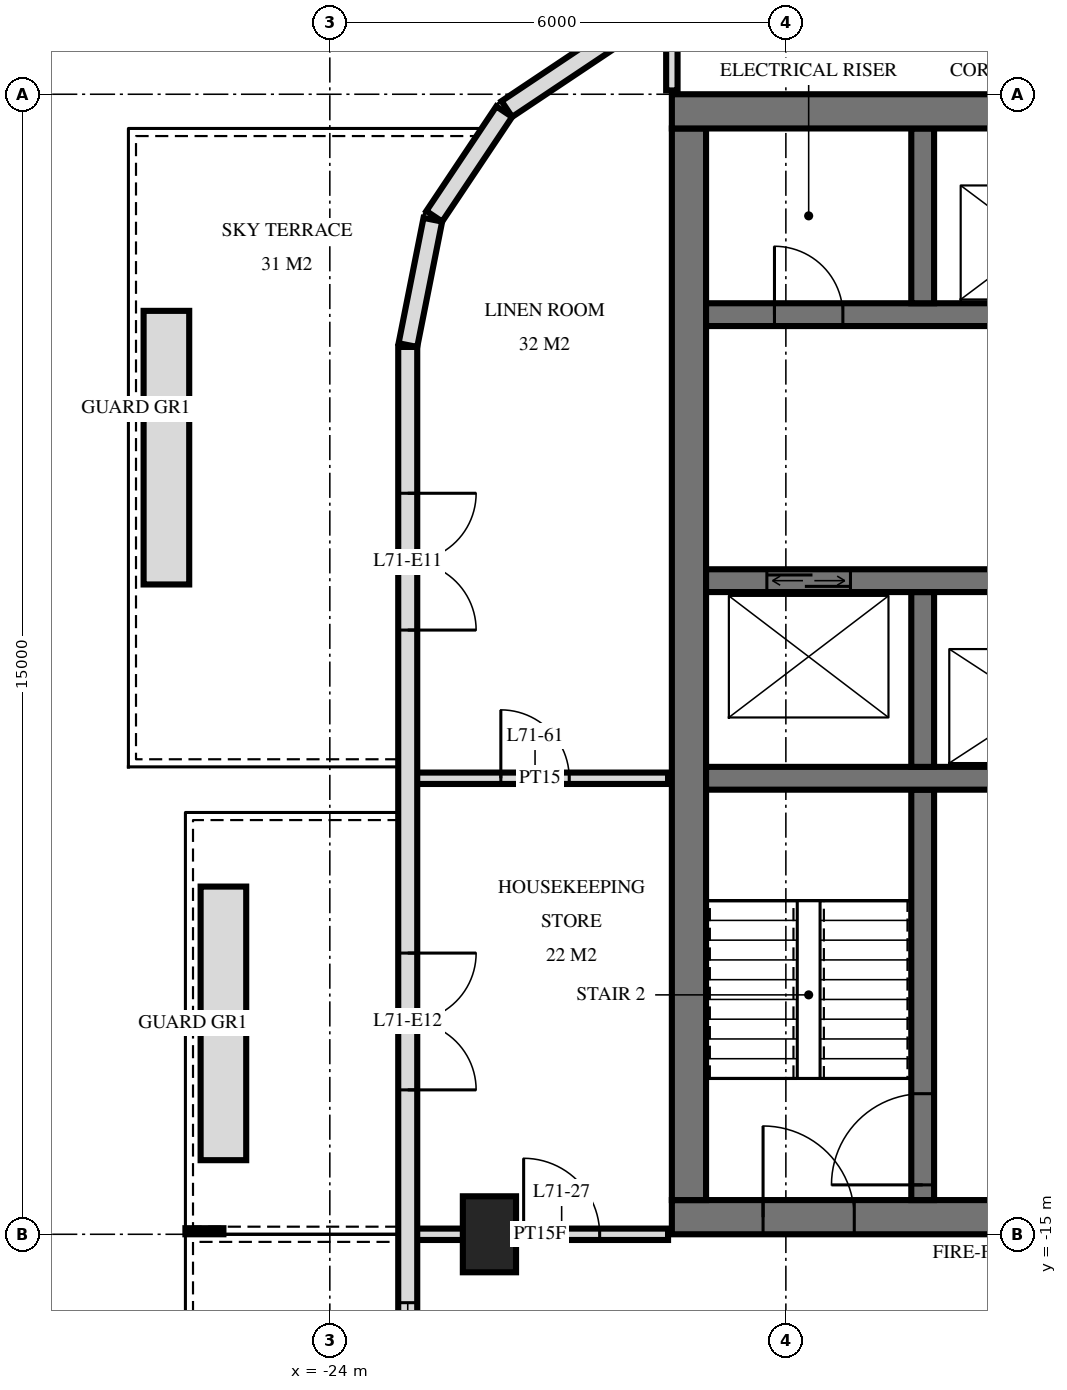
"""IFC4 building model, lengths in metres.
Left out: names, types, materials, properties, quantities, classifications, styles, units other than length and angle.
Written with IfcOpenShell. Run it as: python <this file> out.ifc"""

import sys

from ifc_helpers import new_model, si_unit, direction, frame, frame_2d, origin, origin_2d, place, context, subcontext, project, spatial, rectangle, extrude, element, fill, save


model = new_model("IFC4")
c1 = context("Model", 3, precision=1e-05, world=origin(), true_north=direction((0.0, 1.0)))
c2 = subcontext(c1, "Body", "Model", "MODEL_VIEW")
j1 = project(units=[si_unit("LENGTHUNIT", "METRE"), si_unit("PLANEANGLEUNIT", "RADIAN")], contexts=[c1])
p1 = place(None, origin())
s1 = spatial("IfcSite", under=j1, at=p1, CompositionType="ELEMENT")
p2 = place(p1, origin())
s2 = spatial("IfcBuilding", under=s1, at=p2, CompositionType="ELEMENT")
p3 = place(p2, frame((0.0, 0.0, 270.1)))
s3 = spatial("IfcBuildingStorey", under=s2, at=p3, CompositionType="ELEMENT", Elevation=270.1)
p4 = place(p3, frame((-21.9, -15.0, 0.0), z_axis=(0.0, 0.0, 1.0), x_axis=(0.0, 1.0, 0.0)))
e1 = element("IfcColumn", 1, at=p4, inside=s3, PredefinedType="COLUMN", context=c2, shape_type="SweptSolid", body=[
    extrude(rectangle(XDim=1.0, YDim=0.7, at=origin_2d()), origin(), (0.0, 0.0, 1.0), 3.5),
])
p5 = place(p3, frame((-19.5, -0.225, 0.0), z_axis=(0.0, 0.0, 1.0), x_axis=(1.0, 0.0, 0.0)))
e2 = element("IfcWall", 2, at=p5, inside=s3, PredefinedType="SHEAR", context=c2, shape_type="SweptSolid", body=[
    extrude(rectangle(XDim=9.5, YDim=0.45, at=frame_2d((4.75, 0.0))), origin(), (0.0, 0.0, 1.0), 3.5),
])
p6 = place(p3, frame((-19.5, -14.775, 0.0), z_axis=(0.0, 0.0, 1.0), x_axis=(1.0, 0.0, 0.0)))
e3 = element("IfcWall", 3, at=p6, inside=s3, PredefinedType="SHEAR", context=c2, shape_type="SweptSolid", body=[
    extrude(rectangle(XDim=9.5, YDim=0.45, at=frame_2d((4.75, 0.0))), origin(), (0.0, 0.0, 1.0), 3.5),
])
p7 = place(p6, frame((1.2, 0.0, 0.0)))
e4 = element("IfcOpeningElement", 4, at=p7, cuts=e3, PredefinedType="OPENING", context=c2, shape_type="SweptSolid", body=[
    extrude(rectangle(XDim=1.2, YDim=2.1, at=frame_2d((0.6, 1.05))), frame((0.0, 0.235, 0.0), z_axis=(0.0, -1.0, 0.0), x_axis=(1.0, 0.0, 0.0)), (0.0, 0.0, 1.0), 0.47),
])
p8 = place(p6, frame((4.25, 0.0, 0.0)))
e5 = element("IfcOpeningElement", 5, at=p8, cuts=e3, PredefinedType="OPENING", context=c2, shape_type="SweptSolid", body=[
    extrude(rectangle(XDim=1.1, YDim=2.1, at=frame_2d((0.55, 1.05))), frame((0.0, 0.235, 0.0), z_axis=(0.0, -1.0, 0.0), x_axis=(1.0, 0.0, 0.0)), (0.0, 0.0, 1.0), 0.47),
])
p9 = place(p3, frame((-19.275, -14.55, 0.0), z_axis=(0.0, 0.0, 1.0), x_axis=(0.0, 1.0, 0.0)))
e6 = element("IfcWall", 6, at=p9, inside=s3, PredefinedType="SHEAR", context=c2, shape_type="SweptSolid", body=[
    extrude(rectangle(XDim=14.1, YDim=0.45, at=frame_2d((7.05, 0.0))), origin(), (0.0, 0.0, 1.0), 3.5),
])
p10 = place(p3, frame((-19.05, -2.9, 0.0), z_axis=(0.0, 0.0, 1.0), x_axis=(1.0, 0.0, 0.0)))
e7 = element("IfcWall", 7, at=p10, inside=s3, PredefinedType="SHEAR", context=c2, shape_type="SweptSolid", body=[
    extrude(rectangle(XDim=8.7, YDim=0.3, at=frame_2d((4.35, 0.0))), origin(), (0.0, 0.0, 1.0), 3.5),
])
p11 = place(p10, frame((6.8, 0.0, 0.0)))
e8 = element("IfcOpeningElement", 8, at=p11, cuts=e7, PredefinedType="OPENING", context=c2, shape_type="SweptSolid", body=[
    extrude(rectangle(XDim=1.1, YDim=2.1, at=frame_2d((0.55, 1.05))), frame((0.0, 0.16, 0.0), z_axis=(0.0, -1.0, 0.0), x_axis=(1.0, 0.0, 0.0)), (0.0, 0.0, 1.0), 0.32),
])
p12 = place(p10, frame((3.8, 0.0, 0.0)))
e9 = element("IfcOpeningElement", 9, at=p12, cuts=e7, PredefinedType="OPENING", context=c2, shape_type="SweptSolid", body=[
    extrude(rectangle(XDim=1.1, YDim=2.1, at=frame_2d((0.55, 1.05))), frame((0.0, 0.16, 0.0), z_axis=(0.0, -1.0, 0.0), x_axis=(1.0, 0.0, 0.0)), (0.0, 0.0, 1.0), 0.32),
])
p13 = place(p10, frame((0.9, 0.0, 0.0)))
e10 = element("IfcOpeningElement", 10, at=p13, cuts=e7, PredefinedType="OPENING", context=c2, shape_type="SweptSolid", body=[
    extrude(rectangle(XDim=0.9, YDim=2.1, at=frame_2d((0.45, 1.05))), frame((0.0, 0.16, 0.0), z_axis=(0.0, -1.0, 0.0), x_axis=(1.0, 0.0, 0.0)), (0.0, 0.0, 1.0), 0.32),
])
p14 = place(p3, frame((-19.05, -6.4, 0.0), z_axis=(0.0, 0.0, 1.0), x_axis=(1.0, 0.0, 0.0)))
e11 = element("IfcWall", 11, at=p14, inside=s3, PredefinedType="SHEAR", context=c2, shape_type="SweptSolid", body=[
    extrude(rectangle(XDim=8.7, YDim=0.3, at=frame_2d((4.35, 0.0))), origin(), (0.0, 0.0, 1.0), 3.5),
])
p15 = place(p14, frame((0.8, 0.0, 0.0)))
e12 = element("IfcOpeningElement", 12, at=p15, cuts=e11, PredefinedType="OPENING", context=c2, shape_type="SweptSolid", body=[
    extrude(rectangle(XDim=1.1, YDim=2.1, at=frame_2d((0.55, 1.05))), frame((0.0, 0.16, 0.0), z_axis=(0.0, -1.0, 0.0), x_axis=(1.0, 0.0, 0.0)), (0.0, 0.0, 1.0), 0.32),
])
p16 = place(p3, frame((-19.05, -9.0, 0.0), z_axis=(0.0, 0.0, 1.0), x_axis=(1.0, 0.0, 0.0)))
e13 = element("IfcWall", 13, at=p16, inside=s3, PredefinedType="SHEAR", context=c2, shape_type="SweptSolid", body=[
    extrude(rectangle(XDim=8.7, YDim=0.3, at=frame_2d((4.35, 0.0))), origin(), (0.0, 0.0, 1.0), 3.5),
])
p17 = place(p16, frame((3.8, 0.0, 0.0)))
e14 = element("IfcOpeningElement", 14, at=p17, cuts=e13, PredefinedType="OPENING", context=c2, shape_type="SweptSolid", body=[
    extrude(rectangle(XDim=1.1, YDim=2.1, at=frame_2d((0.55, 1.05))), frame((0.0, 0.16, 0.0), z_axis=(0.0, -1.0, 0.0), x_axis=(1.0, 0.0, 0.0)), (0.0, 0.0, 1.0), 0.32),
])
for number, where, z_axis, x_axis in (
    (15, (-16.2, -2.75, 0.0), (0.0, 0.0, 1.0), (0.0, 1.0, 0.0)),
    (16, (-16.2, -8.85, 0.0), (0.0, 0.0, 1.0), (0.0, 1.0, 0.0)),
):
    element("IfcWall", number, at=place(p3, frame(where, z_axis=z_axis, x_axis=x_axis)), inside=s3, PredefinedType="SHEAR", context=c2, shape_type="SweptSolid", body=[
        extrude(rectangle(XDim=2.3, YDim=0.3, at=frame_2d((1.15, 0.0))), origin(), (0.0, 0.0, 1.0), 3.5),
    ])
p18 = place(p3, frame((-16.2, -14.55, 0.0), z_axis=(0.0, 0.0, 1.0), x_axis=(0.0, 1.0, 0.0)))
e17 = element("IfcWall", 17, at=p18, inside=s3, PredefinedType="SHEAR", context=c2, shape_type="SweptSolid", body=[
    extrude(rectangle(XDim=5.4, YDim=0.3, at=frame_2d((2.7, 0.0))), origin(), (0.0, 0.0, 1.0), 3.5),
])
p19 = place(p18, frame((0.2, 0.0, 0.0)))
e18 = element("IfcOpeningElement", 18, at=p19, cuts=e17, PredefinedType="OPENING", context=c2, shape_type="SweptSolid", body=[
    extrude(rectangle(XDim=1.2, YDim=2.1, at=frame_2d((0.6, 1.05))), frame((0.0, 0.16, 0.0), z_axis=(0.0, -1.0, 0.0), x_axis=(1.0, 0.0, 0.0)), (0.0, 0.0, 1.0), 0.32),
])
for number, where, z_axis, x_axis in (
    (19, (-20.294, 0.726, 0.0), (0.0, 0.0, 1.0), (-0.831, -0.556, 0.0)),
    (20, (-21.706, -0.229, 0.0), (0.0, 0.0, 1.0), (-0.556, -0.831, 0.0)),
):
    element("IfcWall", number, at=place(p3, frame(where, z_axis=z_axis, x_axis=x_axis)), inside=s3, PredefinedType="SOLIDWALL", context=c2, shape_type="SweptSolid", body=[
        extrude(rectangle(XDim=1.656, YDim=0.25, at=frame_2d((0.828, 0.0))), origin(), (0.0, 0.0, 1.0), 3.22),
    ])
p20 = place(p3, frame((-22.645, -1.651, 0.0), z_axis=(0.0, 0.0, 1.0), x_axis=(-0.19513878023, -0.980775640221, 0.0)))
e21 = element("IfcWall", 21, at=p20, inside=s3, PredefinedType="SOLIDWALL", context=c2, shape_type="SweptSolid", body=[
    extrude(rectangle(XDim=1.681, YDim=0.25, at=frame_2d((0.841, 0.0))), origin(), (0.0, 0.0, 1.0), 3.22),
])
p21 = place(p3, frame((-22.975, -3.325, 0.0), z_axis=(0.0, 0.0, 1.0), x_axis=(0.0, -1.0, 0.0)))
e22 = element("IfcWall", 22, at=p21, inside=s3, PredefinedType="SOLIDWALL", context=c2, shape_type="SweptSolid", body=[
    extrude(rectangle(XDim=25.951, YDim=0.25, at=frame_2d((12.975, 0.0))), origin(), (0.0, 0.0, 1.0), 3.22),
])
p22 = place(p21, frame((1.925, 0.0, 0.0)))
e23 = element("IfcOpeningElement", 23, at=p22, cuts=e22, PredefinedType="OPENING", context=c2, shape_type="SweptSolid", body=[
    extrude(rectangle(XDim=1.8, YDim=2.4, at=frame_2d((0.9, 1.2))), frame((0.0, 0.135, 0.0), z_axis=(0.0, -1.0, 0.0), x_axis=(1.0, 0.0, 0.0)), (0.0, 0.0, 1.0), 0.27),
])
p23 = place(p21, frame((7.975, 0.0, 0.0)))
e24 = element("IfcOpeningElement", 24, at=p23, cuts=e22, PredefinedType="OPENING", context=c2, shape_type="SweptSolid", body=[
    extrude(rectangle(XDim=1.8, YDim=2.4, at=frame_2d((0.9, 1.2))), frame((0.0, 0.135, 0.0), z_axis=(0.0, -1.0, 0.0), x_axis=(1.0, 0.0, 0.0)), (0.0, 0.0, 1.0), 0.27),
])
p24 = place(p21, frame((12.575, 0.0, 0.9)))
e25 = element("IfcOpeningElement", 25, at=p24, cuts=e22, PredefinedType="OPENING", context=c2, shape_type="SweptSolid", body=[
    extrude(rectangle(XDim=1.2, YDim=1.5, at=frame_2d((0.6, 0.75))), frame((0.0, 0.135, 0.0), z_axis=(0.0, -1.0, 0.0), x_axis=(1.0, 0.0, 0.0)), (0.0, 0.0, 1.0), 0.27),
])
p25 = place(p21, frame((15.775, 0.0, 0.0)))
e26 = element("IfcOpeningElement", 26, at=p25, cuts=e22, PredefinedType="OPENING", context=c2, shape_type="SweptSolid", body=[
    extrude(rectangle(XDim=1.8, YDim=2.4, at=frame_2d((0.9, 1.2))), frame((0.0, 0.135, 0.0), z_axis=(0.0, -1.0, 0.0), x_axis=(1.0, 0.0, 0.0)), (0.0, 0.0, 1.0), 0.27),
])
p26 = place(p21, frame((21.075, 0.0, 0.0)))
e27 = element("IfcOpeningElement", 27, at=p26, cuts=e22, PredefinedType="OPENING", context=c2, shape_type="SweptSolid", body=[
    extrude(rectangle(XDim=1.8, YDim=2.4, at=frame_2d((0.9, 1.2))), frame((0.0, 0.135, 0.0), z_axis=(0.0, -1.0, 0.0), x_axis=(1.0, 0.0, 0.0)), (0.0, 0.0, 1.0), 0.27),
])
p27 = place(p21, frame((23.825, 0.0, 0.9)))
e28 = element("IfcOpeningElement", 28, at=p27, cuts=e22, PredefinedType="OPENING", context=c2, shape_type="SweptSolid", body=[
    extrude(rectangle(XDim=1.8, YDim=1.5, at=frame_2d((0.9, 0.75))), frame((0.0, 0.135, 0.0), z_axis=(0.0, -1.0, 0.0), x_axis=(1.0, 0.0, 0.0)), (0.0, 0.0, 1.0), 0.27),
])
for number, where, z_axis, x_axis in (
    (29, (-25.4, -14.025, 0.0), (0.0, 0.0, 1.0), (0.0, 1.0, 0.0)),
    (30, (-26.15, -6.45, 0.0), (0.0, 0.0, 1.0), (0.0, 1.0, 0.0)),
):
    element("IfcWall", number, at=place(p3, frame(where, z_axis=z_axis, x_axis=x_axis)), inside=s3, PredefinedType="USERDEFINED", context=c2, shape_type="SweptSolid", body=[
        extrude(rectangle(XDim=3.6, YDim=0.6, at=frame_2d((1.8, 0.0))), origin(), (0.0, 0.0, 1.0), 0.65),
    ])
p28 = place(p3, frame((-19.5, 0.05, 0.0), z_axis=(0.0, 0.0, 1.0), x_axis=(0.0, 1.0, 0.0)))
e31 = element("IfcWall", 31, at=p28, inside=s3, PredefinedType="PARTITIONING", context=c2, shape_type="SweptSolid", body=[
    extrude(rectangle(XDim=0.787, YDim=0.15, at=frame_2d((0.394, 0.0))), origin(), (0.0, 0.0, 1.0), 3.22),
])
p29 = place(p3, frame((-22.92, -15.0, 0.0), z_axis=(0.0, 0.0, 1.0), x_axis=(1.0, 0.0, 0.0)))
e32 = element("IfcWall", 32, at=p29, inside=s3, PredefinedType="PARTITIONING", context=c2, shape_type="SweptSolid", body=[
    extrude(rectangle(XDim=3.37, YDim=0.15, at=frame_2d((1.685, 0.0))), origin(), (0.0, 0.0, 1.0), 3.22),
])
p30 = place(p29, frame((1.47, 0.0, 0.0)))
e33 = element("IfcOpeningElement", 33, at=p30, cuts=e32, PredefinedType="OPENING", context=c2, shape_type="SweptSolid", body=[
    extrude(rectangle(XDim=1.0, YDim=2.1, at=frame_2d((0.5, 1.05))), frame((0.0, 0.085, 0.0), z_axis=(0.0, -1.0, 0.0), x_axis=(1.0, 0.0, 0.0)), (0.0, 0.0, 1.0), 0.17),
])
p31 = place(p3, frame((-22.92, -9.0, 0.0), z_axis=(0.0, 0.0, 1.0), x_axis=(1.0, 0.0, 0.0)))
e34 = element("IfcWall", 34, at=p31, inside=s3, PredefinedType="PARTITIONING", context=c2, shape_type="SweptSolid", body=[
    extrude(rectangle(XDim=3.37, YDim=0.15, at=frame_2d((1.685, 0.0))), origin(), (0.0, 0.0, 1.0), 3.22),
])
p32 = place(p31, frame((1.17, 0.0, 0.0)))
e35 = element("IfcOpeningElement", 35, at=p32, cuts=e34, PredefinedType="OPENING", context=c2, shape_type="SweptSolid", body=[
    extrude(rectangle(XDim=0.9, YDim=2.1, at=frame_2d((0.45, 1.05))), frame((0.0, 0.085, 0.0), z_axis=(0.0, -1.0, 0.0), x_axis=(1.0, 0.0, 0.0)), (0.0, 0.0, 1.0), 0.17),
])
p33 = place(p22, origin())
e36 = element("IfcDoor", 36, at=p33, inside=s3, OperationType="DOUBLE_DOOR_SINGLE_SWING", PredefinedType="DOOR", context=c2, shape_type="SweptSolid", body=[
    extrude(rectangle(XDim=1.8, YDim=2.4, at=frame_2d((0.9, 1.2))), frame((0.0, 0.025, 0.0), z_axis=(0.0, -1.0, 0.0), x_axis=(1.0, 0.0, 0.0)), (0.0, 0.0, 1.0), 0.05),
])
fill(e23, e36)
p34 = place(p23, origin())
e37 = element("IfcDoor", 37, at=p34, inside=s3, OperationType="DOUBLE_DOOR_SINGLE_SWING", PredefinedType="DOOR", context=c2, shape_type="SweptSolid", body=[
    extrude(rectangle(XDim=1.8, YDim=2.4, at=frame_2d((0.9, 1.2))), frame((0.0, 0.025, 0.0), z_axis=(0.0, -1.0, 0.0), x_axis=(1.0, 0.0, 0.0)), (0.0, 0.0, 1.0), 0.05),
])
fill(e24, e37)
p35 = place(p24, origin())
e38 = element("IfcWindow", 38, at=p35, inside=s3, PartitioningType="SINGLE_PANEL", PredefinedType="WINDOW", context=c2, shape_type="SweptSolid", body=[
    extrude(rectangle(XDim=1.2, YDim=1.5, at=frame_2d((0.6, 0.75))), frame((0.0, 0.03, 0.0), z_axis=(0.0, -1.0, 0.0), x_axis=(1.0, 0.0, 0.0)), (0.0, 0.0, 1.0), 0.06),
])
fill(e25, e38)
p36 = place(p15, origin())
e39 = element("IfcDoor", 39, at=p36, inside=s3, OperationType="DOUBLE_DOOR_SLIDING", PredefinedType="USERDEFINED", context=c2, shape_type="SweptSolid", body=[
    extrude(rectangle(XDim=1.1, YDim=2.1, at=frame_2d((0.55, 1.05))), frame((0.0, 0.025, 0.0), z_axis=(0.0, -1.0, 0.0), x_axis=(1.0, 0.0, 0.0)), (0.0, 0.0, 1.0), 0.05),
])
fill(e12, e39)
p37 = place(p7, origin())
e40 = element("IfcDoor", 40, at=p37, inside=s3, OperationType="SINGLE_SWING_RIGHT", PredefinedType="DOOR", context=c2, shape_type="SweptSolid", body=[
    extrude(rectangle(XDim=1.2, YDim=2.1, at=frame_2d((0.6, 1.05))), frame((0.0, 0.025, 0.0), z_axis=(0.0, -1.0, 0.0), x_axis=(1.0, 0.0, 0.0)), (0.0, 0.0, 1.0), 0.05),
])
fill(e4, e40)
p38 = place(p13, origin())
e41 = element("IfcDoor", 41, at=p38, inside=s3, OperationType="SINGLE_SWING_RIGHT", PredefinedType="DOOR", context=c2, shape_type="SweptSolid", body=[
    extrude(rectangle(XDim=0.9, YDim=2.1, at=frame_2d((0.45, 1.05))), frame((0.0, 0.025, 0.0), z_axis=(0.0, -1.0, 0.0), x_axis=(1.0, 0.0, 0.0)), (0.0, 0.0, 1.0), 0.05),
])
fill(e10, e41)
p39 = place(p19, origin())
e42 = element("IfcDoor", 42, at=p39, inside=s3, OperationType="SINGLE_SWING_RIGHT", PredefinedType="DOOR", context=c2, shape_type="SweptSolid", body=[
    extrude(rectangle(XDim=1.2, YDim=2.1, at=frame_2d((0.6, 1.05))), frame((0.0, 0.025, 0.0), z_axis=(0.0, -1.0, 0.0), x_axis=(1.0, 0.0, 0.0)), (0.0, 0.0, 1.0), 0.05),
])
fill(e18, e42)
p40 = place(p30, origin())
e43 = element("IfcDoor", 43, at=p40, inside=s3, OperationType="SINGLE_SWING_RIGHT", PredefinedType="DOOR", context=c2, shape_type="SweptSolid", body=[
    extrude(rectangle(XDim=1.0, YDim=2.1, at=frame_2d((0.5, 1.05))), frame((0.0, 0.025, 0.0), z_axis=(0.0, -1.0, 0.0), x_axis=(1.0, 0.0, 0.0)), (0.0, 0.0, 1.0), 0.05),
])
fill(e33, e43)
p41 = place(p32, origin())
e44 = element("IfcDoor", 44, at=p41, inside=s3, OperationType="SINGLE_SWING_RIGHT", PredefinedType="DOOR", context=c2, shape_type="SweptSolid", body=[
    extrude(rectangle(XDim=0.9, YDim=2.1, at=frame_2d((0.45, 1.05))), frame((0.0, 0.025, 0.0), z_axis=(0.0, -1.0, 0.0), x_axis=(1.0, 0.0, 0.0)), (0.0, 0.0, 1.0), 0.05),
])
fill(e35, e44)
save(model, sys.argv[1])
